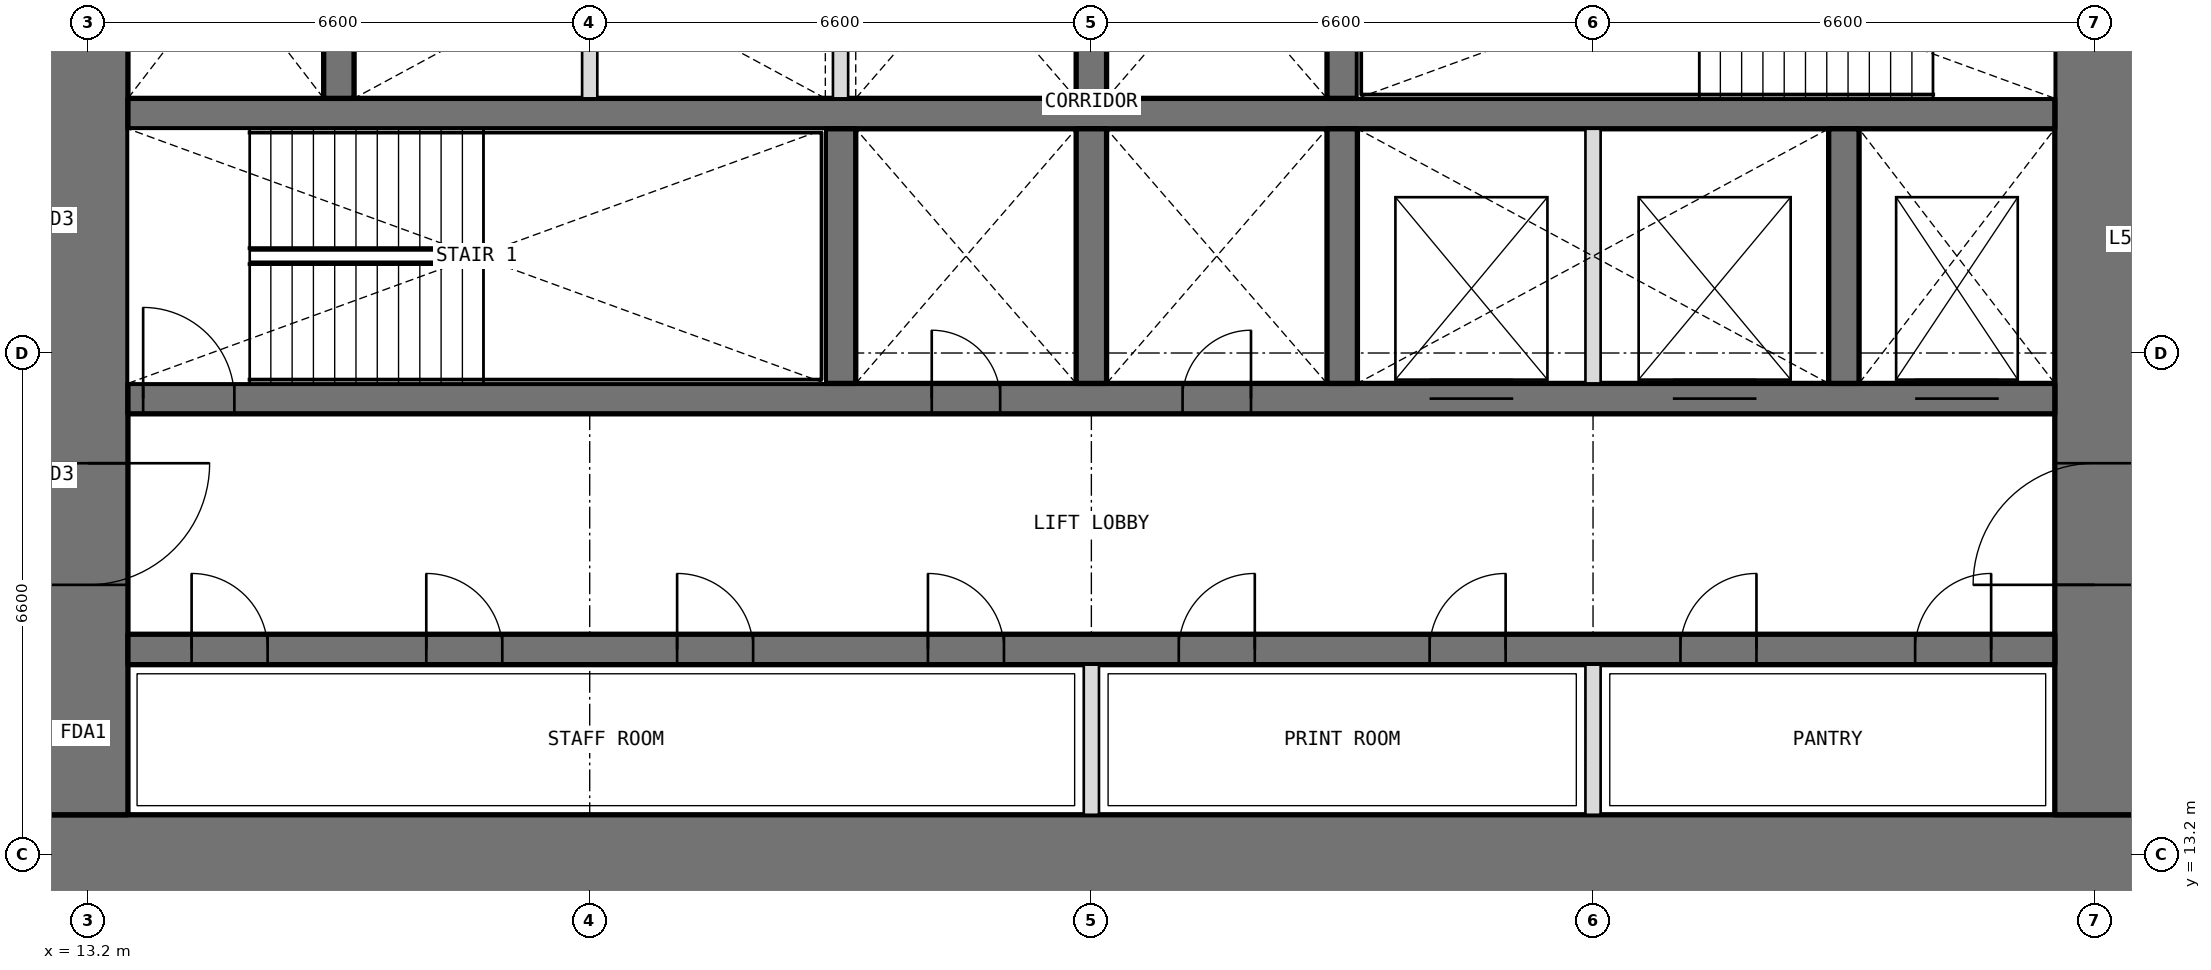
"""IFC4 building model, lengths in metres.
Left out: names, types, materials, properties, quantities, classifications, styles, units other than length and angle.
Written with IfcOpenShell. Run it as: python <this file> out.ifc"""

import sys

from ifc_helpers import new_model, si_unit, direction, frame, frame_2d, origin, place, context, subcontext, project, spatial, rectangle, extrude, element, fill, save


model = new_model("IFC4")
c1 = context("Model", 3, precision=1e-05, world=origin(), true_north=direction((0.0, 1.0)))
c2 = subcontext(c1, "Body", "Model", "MODEL_VIEW")
j1 = project(units=[si_unit("LENGTHUNIT", "METRE"), si_unit("PLANEANGLEUNIT", "RADIAN")], contexts=[c1])
p1 = place(None, origin())
s1 = spatial("IfcSite", under=j1, at=p1, CompositionType="ELEMENT")
p2 = place(p1, origin())
s2 = spatial("IfcBuilding", under=s1, at=p2, CompositionType="ELEMENT")
p3 = place(p2, frame((0.0, 0.0, 237.6)))
s3 = spatial("IfcBuildingStorey", under=s2, at=p3, CompositionType="ELEMENT", Elevation=237.6)
p4 = place(p3, frame((12.675, 13.2, 0.0), z_axis=(0.0, 0.0, 1.0), x_axis=(1.0, 0.0, 0.0)))
e1 = element("IfcWall", 1, at=p4, inside=s3, PredefinedType="SHEAR", context=c2, shape_type="SweptSolid", body=[
    extrude(rectangle(XDim=27.45, YDim=1.05, at=frame_2d((13.725, 0.0))), origin(), (0.0, 0.0, 1.0), 4.2),
])
p5 = place(p3, frame((39.6, 13.725, 0.0), z_axis=(0.0, 0.0, 1.0), x_axis=(0.0, 1.0, 0.0)))
e2 = element("IfcWall", 2, at=p5, inside=s3, PredefinedType="SHEAR", context=c2, shape_type="SweptSolid", body=[
    extrude(rectangle(XDim=18.75, YDim=1.05, at=frame_2d((9.375, 0.0))), origin(), (0.0, 0.0, 1.0), 4.2),
])
p6 = place(p5, frame((3.025, 0.0, 0.0)))
e3 = element("IfcOpeningElement", 3, at=p6, cuts=e2, PredefinedType="OPENING", context=c2, shape_type="SweptSolid", body=[
    extrude(rectangle(XDim=1.6, YDim=2.1, at=frame_2d((0.8, 1.05))), frame((0.0, 0.535, 0.0), z_axis=(0.0, -1.0, 0.0), x_axis=(1.0, 0.0, 0.0)), (0.0, 0.0, 1.0), 1.07),
])
p7 = place(p5, frame((13.825, 0.0, 0.0)))
e4 = element("IfcOpeningElement", 4, at=p7, cuts=e2, PredefinedType="OPENING", context=c2, shape_type="SweptSolid", body=[
    extrude(rectangle(XDim=1.6, YDim=2.1, at=frame_2d((0.8, 1.05))), frame((0.0, 0.535, 0.0), z_axis=(0.0, -1.0, 0.0), x_axis=(1.0, 0.0, 0.0)), (0.0, 0.0, 1.0), 1.07),
])
p8 = place(p3, frame((13.2, 32.475, 0.0), z_axis=(0.0, 0.0, 1.0), x_axis=(0.0, -1.0, 0.0)))
e5 = element("IfcWall", 5, at=p8, inside=s3, PredefinedType="SHEAR", context=c2, shape_type="SweptSolid", body=[
    extrude(rectangle(XDim=18.75, YDim=1.05, at=frame_2d((9.375, 0.0))), origin(), (0.0, 0.0, 1.0), 4.2),
])
p9 = place(p8, frame((14.125, 0.0, 0.0)))
e6 = element("IfcOpeningElement", 6, at=p9, cuts=e5, PredefinedType="OPENING", context=c2, shape_type="SweptSolid", body=[
    extrude(rectangle(XDim=1.6, YDim=2.1, at=frame_2d((0.8, 1.05))), frame((0.0, 0.535, 0.0), z_axis=(0.0, -1.0, 0.0), x_axis=(1.0, 0.0, 0.0)), (0.0, 0.0, 1.0), 1.07),
])
p10 = place(p8, frame((3.325, 0.0, 0.0)))
e7 = element("IfcOpeningElement", 7, at=p10, cuts=e5, PredefinedType="OPENING", context=c2, shape_type="SweptSolid", body=[
    extrude(rectangle(XDim=1.6, YDim=2.1, at=frame_2d((0.8, 1.05))), frame((0.0, 0.535, 0.0), z_axis=(0.0, -1.0, 0.0), x_axis=(1.0, 0.0, 0.0)), (0.0, 0.0, 1.0), 1.07),
])
p11 = place(p3, frame((13.725, 15.9, 0.0), z_axis=(0.0, 0.0, 1.0), x_axis=(1.0, 0.0, 0.0)))
e8 = element("IfcWall", 8, at=p11, inside=s3, PredefinedType="SHEAR", context=c2, shape_type="SweptSolid", body=[
    extrude(rectangle(XDim=25.35, YDim=0.4, at=frame_2d((12.675, 0.0))), origin(), (0.0, 0.0, 1.0), 4.2),
])
p12 = place(p11, frame((0.837, 0.0, 0.0)))
e9 = element("IfcOpeningElement", 9, at=p12, cuts=e8, PredefinedType="OPENING", context=c2, shape_type="SweptSolid", body=[
    extrude(rectangle(XDim=1.0, YDim=2.1, at=frame_2d((0.5, 1.05))), frame((0.0, 0.21, 0.0), z_axis=(0.0, -1.0, 0.0), x_axis=(1.0, 0.0, 0.0)), (0.0, 0.0, 1.0), 0.42),
])
p13 = place(p11, frame((3.925, 0.0, 0.0)))
e10 = element("IfcOpeningElement", 10, at=p13, cuts=e8, PredefinedType="OPENING", context=c2, shape_type="SweptSolid", body=[
    extrude(rectangle(XDim=1.0, YDim=2.1, at=frame_2d((0.5, 1.05))), frame((0.0, 0.21, 0.0), z_axis=(0.0, -1.0, 0.0), x_axis=(1.0, 0.0, 0.0)), (0.0, 0.0, 1.0), 0.42),
])
p14 = place(p11, frame((7.225, 0.0, 0.0)))
e11 = element("IfcOpeningElement", 11, at=p14, cuts=e8, PredefinedType="OPENING", context=c2, shape_type="SweptSolid", body=[
    extrude(rectangle(XDim=1.0, YDim=2.1, at=frame_2d((0.5, 1.05))), frame((0.0, 0.21, 0.0), z_axis=(0.0, -1.0, 0.0), x_axis=(1.0, 0.0, 0.0)), (0.0, 0.0, 1.0), 0.42),
])
p15 = place(p11, frame((10.525, 0.0, 0.0)))
e12 = element("IfcOpeningElement", 12, at=p15, cuts=e8, PredefinedType="OPENING", context=c2, shape_type="SweptSolid", body=[
    extrude(rectangle(XDim=1.0, YDim=2.1, at=frame_2d((0.5, 1.05))), frame((0.0, 0.21, 0.0), z_axis=(0.0, -1.0, 0.0), x_axis=(1.0, 0.0, 0.0)), (0.0, 0.0, 1.0), 0.42),
])
p16 = place(p11, frame((13.825, 0.0, 0.0)))
e13 = element("IfcOpeningElement", 13, at=p16, cuts=e8, PredefinedType="OPENING", context=c2, shape_type="SweptSolid", body=[
    extrude(rectangle(XDim=1.0, YDim=2.1, at=frame_2d((0.5, 1.05))), frame((0.0, 0.21, 0.0), z_axis=(0.0, -1.0, 0.0), x_axis=(1.0, 0.0, 0.0)), (0.0, 0.0, 1.0), 0.42),
])
p17 = place(p11, frame((17.125, 0.0, 0.0)))
e14 = element("IfcOpeningElement", 14, at=p17, cuts=e8, PredefinedType="OPENING", context=c2, shape_type="SweptSolid", body=[
    extrude(rectangle(XDim=1.0, YDim=2.1, at=frame_2d((0.5, 1.05))), frame((0.0, 0.21, 0.0), z_axis=(0.0, -1.0, 0.0), x_axis=(1.0, 0.0, 0.0)), (0.0, 0.0, 1.0), 0.42),
])
p18 = place(p11, frame((20.425, 0.0, 0.0)))
e15 = element("IfcOpeningElement", 15, at=p18, cuts=e8, PredefinedType="OPENING", context=c2, shape_type="SweptSolid", body=[
    extrude(rectangle(XDim=1.0, YDim=2.1, at=frame_2d((0.5, 1.05))), frame((0.0, 0.21, 0.0), z_axis=(0.0, -1.0, 0.0), x_axis=(1.0, 0.0, 0.0)), (0.0, 0.0, 1.0), 0.42),
])
p19 = place(p11, frame((23.512, 0.0, 0.0)))
e16 = element("IfcOpeningElement", 16, at=p19, cuts=e8, PredefinedType="OPENING", context=c2, shape_type="SweptSolid", body=[
    extrude(rectangle(XDim=1.0, YDim=2.1, at=frame_2d((0.5, 1.05))), frame((0.0, 0.21, 0.0), z_axis=(0.0, -1.0, 0.0), x_axis=(1.0, 0.0, 0.0)), (0.0, 0.0, 1.0), 0.42),
])
p20 = place(p3, frame((13.725, 19.2, 0.0), z_axis=(0.0, 0.0, 1.0), x_axis=(1.0, 0.0, 0.0)))
e17 = element("IfcWall", 17, at=p20, inside=s3, PredefinedType="SHEAR", context=c2, shape_type="SweptSolid", body=[
    extrude(rectangle(XDim=25.35, YDim=0.4, at=frame_2d((12.675, 0.0))), origin(), (0.0, 0.0, 1.0), 4.2),
])
p21 = place(p20, frame((10.575, 0.0, 0.0)))
e18 = element("IfcOpeningElement", 18, at=p21, cuts=e17, PredefinedType="OPENING", context=c2, shape_type="SweptSolid", body=[
    extrude(rectangle(XDim=0.9, YDim=2.1, at=frame_2d((0.45, 1.05))), frame((0.0, 0.21, 0.0), z_axis=(0.0, -1.0, 0.0), x_axis=(1.0, 0.0, 0.0)), (0.0, 0.0, 1.0), 0.42),
])
p22 = place(p20, frame((13.875, 0.0, 0.0)))
e19 = element("IfcOpeningElement", 19, at=p22, cuts=e17, PredefinedType="OPENING", context=c2, shape_type="SweptSolid", body=[
    extrude(rectangle(XDim=0.9, YDim=2.1, at=frame_2d((0.45, 1.05))), frame((0.0, 0.21, 0.0), z_axis=(0.0, -1.0, 0.0), x_axis=(1.0, 0.0, 0.0)), (0.0, 0.0, 1.0), 0.42),
])
p23 = place(p20, frame((0.2, 0.0, 0.0)))
e20 = element("IfcOpeningElement", 20, at=p23, cuts=e17, PredefinedType="OPENING", context=c2, shape_type="SweptSolid", body=[
    extrude(rectangle(XDim=1.2, YDim=2.1, at=frame_2d((0.6, 1.05))), frame((0.0, 0.21, 0.0), z_axis=(0.0, -1.0, 0.0), x_axis=(1.0, 0.0, 0.0)), (0.0, 0.0, 1.0), 0.42),
])
p24 = place(p20, frame((23.512, 0.0, 0.0)))
e21 = element("IfcOpeningElement", 21, at=p24, cuts=e17, PredefinedType="OPENING", context=c2, shape_type="SweptSolid", body=[
    extrude(rectangle(XDim=1.1, YDim=2.1, at=frame_2d((0.55, 1.05))), frame((0.0, 0.21, 0.0), z_axis=(0.0, -1.0, 0.0), x_axis=(1.0, 0.0, 0.0)), (0.0, 0.0, 1.0), 0.42),
])
p25 = place(p20, frame((17.125, 0.0, 0.0)))
e22 = element("IfcOpeningElement", 22, at=p25, cuts=e17, PredefinedType="OPENING", context=c2, shape_type="SweptSolid", body=[
    extrude(rectangle(XDim=1.1, YDim=2.1, at=frame_2d((0.55, 1.05))), frame((0.0, 0.21, 0.0), z_axis=(0.0, -1.0, 0.0), x_axis=(1.0, 0.0, 0.0)), (0.0, 0.0, 1.0), 0.42),
])
p26 = place(p20, frame((20.325, 0.0, 0.0)))
e23 = element("IfcOpeningElement", 23, at=p26, cuts=e17, PredefinedType="OPENING", context=c2, shape_type="SweptSolid", body=[
    extrude(rectangle(XDim=1.1, YDim=2.1, at=frame_2d((0.55, 1.05))), frame((0.0, 0.21, 0.0), z_axis=(0.0, -1.0, 0.0), x_axis=(1.0, 0.0, 0.0)), (0.0, 0.0, 1.0), 0.42),
])
p27 = place(p3, frame((13.725, 22.95, 0.0), z_axis=(0.0, 0.0, 1.0), x_axis=(1.0, 0.0, 0.0)))
e24 = element("IfcWall", 24, at=p27, inside=s3, PredefinedType="SHEAR", context=c2, shape_type="SweptSolid", body=[
    extrude(rectangle(XDim=25.35, YDim=0.4, at=frame_2d((12.675, 0.0))), origin(), (0.0, 0.0, 1.0), 4.2),
])
for number, where, z_axis, x_axis in (
    (25, (23.1, 19.4, 0.0), (0.0, 0.0, 1.0), (0.0, 1.0, 0.0)),
    (26, (26.4, 19.4, 0.0), (0.0, 0.0, 1.0), (0.0, 1.0, 0.0)),
    (27, (29.7, 19.4, 0.0), (0.0, 0.0, 1.0), (0.0, 1.0, 0.0)),
    (28, (36.3, 19.4, 0.0), (0.0, 0.0, 1.0), (0.0, 1.0, 0.0)),
    (29, (16.5, 23.15, 0.0), (0.0, 0.0, 1.0), (0.0, 1.0, 0.0)),
    (30, (26.4, 23.15, 0.0), (0.0, 0.0, 1.0), (0.0, 1.0, 0.0)),
    (31, (29.7, 23.15, 0.0), (0.0, 0.0, 1.0), (0.0, 1.0, 0.0)),
):
    element("IfcWall", number, at=place(p3, frame(where, z_axis=z_axis, x_axis=x_axis)), inside=s3, PredefinedType="SHEAR", context=c2, shape_type="SweptSolid", body=[
        extrude(rectangle(XDim=3.35, YDim=0.4, at=frame_2d((1.675, 0.0))), origin(), (0.0, 0.0, 1.0), 4.2),
    ])
for number, where, z_axis, x_axis in (
    (32, (26.4, 13.725, 0.0), (0.0, 0.0, 1.0), (0.0, 1.0, 0.0)),
    (33, (33.0, 13.725, 0.0), (0.0, 0.0, 1.0), (0.0, 1.0, 0.0)),
):
    element("IfcWall", number, at=place(p3, frame(where, z_axis=z_axis, x_axis=x_axis)), inside=s3, PredefinedType="PARTITIONING", context=c2, shape_type="SweptSolid", body=[
        extrude(rectangle(XDim=1.975, YDim=0.2, at=frame_2d((0.987, 0.0))), origin(), (0.0, 0.0, 1.0), 4.2),
    ])
for number, where, z_axis, x_axis in (
    (34, (33.0, 19.4, 0.0), (0.0, 0.0, 1.0), (0.0, 1.0, 0.0)),
    (35, (19.8, 23.15, 0.0), (0.0, 0.0, 1.0), (0.0, 1.0, 0.0)),
    (36, (23.1, 23.15, 0.0), (0.0, 0.0, 1.0), (0.0, 1.0, 0.0)),
):
    element("IfcWall", number, at=place(p3, frame(where, z_axis=z_axis, x_axis=x_axis)), inside=s3, PredefinedType="PARTITIONING", context=c2, shape_type="SweptSolid", body=[
        extrude(rectangle(XDim=3.35, YDim=0.2, at=frame_2d((1.675, 0.0))), origin(), (0.0, 0.0, 1.0), 4.2),
    ])
p28 = place(p21, origin())
e37 = element("IfcDoor", 37, at=p28, inside=s3, OperationType="SINGLE_SWING_LEFT", PredefinedType="DOOR", context=c2, shape_type="SweptSolid", body=[
    extrude(rectangle(XDim=0.9, YDim=2.1, at=frame_2d((0.45, 1.05))), frame((0.0, 0.025, 0.0), z_axis=(0.0, -1.0, 0.0), x_axis=(1.0, 0.0, 0.0)), (0.0, 0.0, 1.0), 0.05),
])
fill(e18, e37)
p29 = place(p22, origin())
e38 = element("IfcDoor", 38, at=p29, inside=s3, OperationType="SINGLE_SWING_RIGHT", PredefinedType="DOOR", context=c2, shape_type="SweptSolid", body=[
    extrude(rectangle(XDim=0.9, YDim=2.1, at=frame_2d((0.45, 1.05))), frame((0.0, 0.025, 0.0), z_axis=(0.0, -1.0, 0.0), x_axis=(1.0, 0.0, 0.0)), (0.0, 0.0, 1.0), 0.05),
])
fill(e19, e38)
p30 = place(p12, origin())
e39 = element("IfcDoor", 39, at=p30, inside=s3, OperationType="SINGLE_SWING_LEFT", PredefinedType="DOOR", context=c2, shape_type="SweptSolid", body=[
    extrude(rectangle(XDim=1.0, YDim=2.1, at=frame_2d((0.5, 1.05))), frame((0.0, 0.025, 0.0), z_axis=(0.0, -1.0, 0.0), x_axis=(1.0, 0.0, 0.0)), (0.0, 0.0, 1.0), 0.05),
])
fill(e9, e39)
p31 = place(p13, origin())
e40 = element("IfcDoor", 40, at=p31, inside=s3, OperationType="SINGLE_SWING_LEFT", PredefinedType="DOOR", context=c2, shape_type="SweptSolid", body=[
    extrude(rectangle(XDim=1.0, YDim=2.1, at=frame_2d((0.5, 1.05))), frame((0.0, 0.025, 0.0), z_axis=(0.0, -1.0, 0.0), x_axis=(1.0, 0.0, 0.0)), (0.0, 0.0, 1.0), 0.05),
])
fill(e10, e40)
p32 = place(p14, origin())
e41 = element("IfcDoor", 41, at=p32, inside=s3, OperationType="SINGLE_SWING_LEFT", PredefinedType="DOOR", context=c2, shape_type="SweptSolid", body=[
    extrude(rectangle(XDim=1.0, YDim=2.1, at=frame_2d((0.5, 1.05))), frame((0.0, 0.025, 0.0), z_axis=(0.0, -1.0, 0.0), x_axis=(1.0, 0.0, 0.0)), (0.0, 0.0, 1.0), 0.05),
])
fill(e11, e41)
p33 = place(p15, origin())
e42 = element("IfcDoor", 42, at=p33, inside=s3, OperationType="SINGLE_SWING_LEFT", PredefinedType="DOOR", context=c2, shape_type="SweptSolid", body=[
    extrude(rectangle(XDim=1.0, YDim=2.1, at=frame_2d((0.5, 1.05))), frame((0.0, 0.025, 0.0), z_axis=(0.0, -1.0, 0.0), x_axis=(1.0, 0.0, 0.0)), (0.0, 0.0, 1.0), 0.05),
])
fill(e12, e42)
p34 = place(p16, origin())
e43 = element("IfcDoor", 43, at=p34, inside=s3, OperationType="SINGLE_SWING_RIGHT", PredefinedType="DOOR", context=c2, shape_type="SweptSolid", body=[
    extrude(rectangle(XDim=1.0, YDim=2.1, at=frame_2d((0.5, 1.05))), frame((0.0, 0.025, 0.0), z_axis=(0.0, -1.0, 0.0), x_axis=(1.0, 0.0, 0.0)), (0.0, 0.0, 1.0), 0.05),
])
fill(e13, e43)
p35 = place(p17, origin())
e44 = element("IfcDoor", 44, at=p35, inside=s3, OperationType="SINGLE_SWING_RIGHT", PredefinedType="DOOR", context=c2, shape_type="SweptSolid", body=[
    extrude(rectangle(XDim=1.0, YDim=2.1, at=frame_2d((0.5, 1.05))), frame((0.0, 0.025, 0.0), z_axis=(0.0, -1.0, 0.0), x_axis=(1.0, 0.0, 0.0)), (0.0, 0.0, 1.0), 0.05),
])
fill(e14, e44)
p36 = place(p18, origin())
e45 = element("IfcDoor", 45, at=p36, inside=s3, OperationType="SINGLE_SWING_RIGHT", PredefinedType="DOOR", context=c2, shape_type="SweptSolid", body=[
    extrude(rectangle(XDim=1.0, YDim=2.1, at=frame_2d((0.5, 1.05))), frame((0.0, 0.025, 0.0), z_axis=(0.0, -1.0, 0.0), x_axis=(1.0, 0.0, 0.0)), (0.0, 0.0, 1.0), 0.05),
])
fill(e15, e45)
p37 = place(p19, origin())
e46 = element("IfcDoor", 46, at=p37, inside=s3, OperationType="SINGLE_SWING_RIGHT", PredefinedType="DOOR", context=c2, shape_type="SweptSolid", body=[
    extrude(rectangle(XDim=1.0, YDim=2.1, at=frame_2d((0.5, 1.05))), frame((0.0, 0.025, 0.0), z_axis=(0.0, -1.0, 0.0), x_axis=(1.0, 0.0, 0.0)), (0.0, 0.0, 1.0), 0.05),
])
fill(e16, e46)
p38 = place(p23, origin())
e47 = element("IfcDoor", 47, at=p38, inside=s3, OperationType="SINGLE_SWING_LEFT", PredefinedType="DOOR", context=c2, shape_type="SweptSolid", body=[
    extrude(rectangle(XDim=1.2, YDim=2.1, at=frame_2d((0.6, 1.05))), frame((0.0, 0.025, 0.0), z_axis=(0.0, -1.0, 0.0), x_axis=(1.0, 0.0, 0.0)), (0.0, 0.0, 1.0), 0.05),
])
fill(e20, e47)
p39 = place(p9, origin())
e48 = element("IfcDoor", 48, at=p39, inside=s3, OperationType="DOUBLE_DOOR_DOUBLE_SWING", PredefinedType="DOOR", context=c2, shape_type="SweptSolid", body=[
    extrude(rectangle(XDim=1.6, YDim=2.1, at=frame_2d((0.8, 1.05))), frame((0.0, 0.025, 0.0), z_axis=(0.0, -1.0, 0.0), x_axis=(1.0, 0.0, 0.0)), (0.0, 0.0, 1.0), 0.05),
])
fill(e6, e48)
p40 = place(p6, origin())
e49 = element("IfcDoor", 49, at=p40, inside=s3, OperationType="DOUBLE_DOOR_DOUBLE_SWING", PredefinedType="DOOR", context=c2, shape_type="SweptSolid", body=[
    extrude(rectangle(XDim=1.6, YDim=2.1, at=frame_2d((0.8, 1.05))), frame((0.0, 0.025, 0.0), z_axis=(0.0, -1.0, 0.0), x_axis=(1.0, 0.0, 0.0)), (0.0, 0.0, 1.0), 0.05),
])
fill(e3, e49)
p41 = place(p24, origin())
e50 = element("IfcDoor", 50, at=p41, inside=s3, OperationType="DOUBLE_DOOR_SLIDING", PredefinedType="DOOR", context=c2, shape_type="SweptSolid", body=[
    extrude(rectangle(XDim=1.1, YDim=2.1, at=frame_2d((0.55, 1.05))), frame((0.0, 0.025, 0.0), z_axis=(0.0, -1.0, 0.0), x_axis=(1.0, 0.0, 0.0)), (0.0, 0.0, 1.0), 0.05),
])
fill(e21, e50)
p42 = place(p25, origin())
e51 = element("IfcDoor", 51, at=p42, inside=s3, OperationType="DOUBLE_DOOR_SLIDING", PredefinedType="DOOR", context=c2, shape_type="SweptSolid", body=[
    extrude(rectangle(XDim=1.1, YDim=2.1, at=frame_2d((0.55, 1.05))), frame((0.0, 0.025, 0.0), z_axis=(0.0, -1.0, 0.0), x_axis=(1.0, 0.0, 0.0)), (0.0, 0.0, 1.0), 0.05),
])
fill(e22, e51)
p43 = place(p26, origin())
e52 = element("IfcDoor", 52, at=p43, inside=s3, OperationType="DOUBLE_DOOR_SLIDING", PredefinedType="DOOR", context=c2, shape_type="SweptSolid", body=[
    extrude(rectangle(XDim=1.1, YDim=2.1, at=frame_2d((0.55, 1.05))), frame((0.0, 0.025, 0.0), z_axis=(0.0, -1.0, 0.0), x_axis=(1.0, 0.0, 0.0)), (0.0, 0.0, 1.0), 0.05),
])
fill(e23, e52)
save(model, sys.argv[1])
